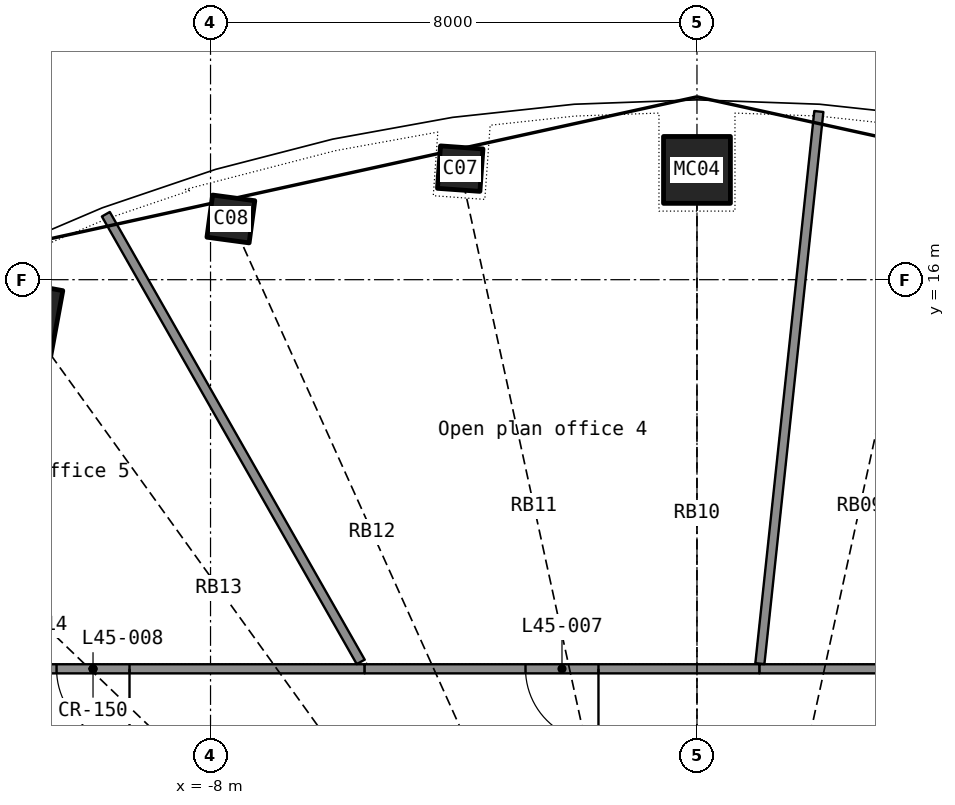
"""IFC4 building model, lengths in metres.
Left out: names, types, materials, properties, quantities, classifications, styles, units other than length and angle.
Written with IfcOpenShell. Run it as: python <this file> out.ifc"""

import sys

from ifc_helpers import new_model, si_unit, direction, frame, frame_2d, origin, origin_2d, place, context, subcontext, project, spatial, rectangle, hollow_rectangle, extrude, element, fill, save


model = new_model("IFC4")
c1 = context("Model", 3, precision=1e-05, world=origin(), true_north=direction((0.0, 1.0)))
c2 = subcontext(c1, "Body", "Model", "MODEL_VIEW")
j1 = project(units=[si_unit("LENGTHUNIT", "METRE"), si_unit("PLANEANGLEUNIT", "RADIAN")], contexts=[c1])
p1 = place(None, origin())
s1 = spatial("IfcSite", under=j1, at=p1, CompositionType="ELEMENT")
p2 = place(p1, origin())
s2 = spatial("IfcBuilding", under=s1, at=p2, CompositionType="ELEMENT")
p3 = place(p2, frame((0.0, 0.0, 186.7)))
s3 = spatial("IfcBuildingStorey", under=s2, at=p3, CompositionType="ELEMENT", Elevation=186.7)
p4 = place(p3, frame((0.0, 17.805, 0.0), z_axis=(0.0, -0.028296154, 0.999599584), x_axis=(1.0, 0.0, 0.0)))
e1 = element("IfcColumn", 1, at=p4, inside=s3, PredefinedType="COLUMN", context=c2, shape_type="SweptSolid", body=[
    extrude(hollow_rectangle(XDim=1.1, YDim=1.1, WallThickness=0.032, at=origin_2d()), origin(), (0.0, 0.0, 1.0), 3.701),
])
for number, where, z_axis, x_axis in (
    (2, (-3.894, 17.826, 0.0), (0.006, -0.028, 1.0), (0.99, 0.14, -0.002)),
    (3, (-7.665, 16.999, 0.0), (0.012, -0.027, 1.0), (0.96, 0.279, -0.004)),
):
    element("IfcColumn", number, at=place(p3, frame(where, z_axis=z_axis, x_axis=x_axis)), inside=s3, PredefinedType="COLUMN", context=c2, shape_type="SweptSolid", body=[
        extrude(hollow_rectangle(XDim=0.7, YDim=0.7, WallThickness=0.025, at=origin_2d()), origin(), (0.0, 0.0, 1.0), 3.701),
    ])
p5 = place(p3, frame((-11.07, 15.378, 0.0), z_axis=(0.017346173, -0.024535271, 0.999548463), x_axis=(0.907569861, 0.419865826, -0.0054438)))
e4 = element("IfcColumn", 4, at=p5, inside=s3, PredefinedType="COLUMN", context=c2, shape_type="SweptSolid", body=[
    extrude(hollow_rectangle(XDim=1.1, YDim=1.1, WallThickness=0.032, at=origin_2d()), origin(), (0.0, 0.0, 1.0), 3.702),
])
p6 = place(p3, frame((11.72, 9.6, 0.0), z_axis=(0.0, 0.0, 1.0), x_axis=(-1.0, 0.0, 0.0)))
e5 = element("IfcWall", 5, at=p6, inside=s3, PredefinedType="PARTITIONING", context=c2, shape_type="SweptSolid", body=[
    extrude(rectangle(XDim=10.695, YDim=0.15, at=frame_2d((5.347, 0.0))), origin(), (0.0, 0.0, 1.0), 2.4),
])
p7 = place(p6, frame((4.747, 0.0, 0.0)))
e6 = element("IfcOpeningElement", 6, at=p7, cuts=e5, PredefinedType="OPENING", context=c2, shape_type="SweptSolid", body=[
    extrude(rectangle(XDim=1.2, YDim=2.2, at=frame_2d((0.6, 1.1))), frame((0.0, 0.085, 0.0), z_axis=(0.0, -1.0, 0.0), x_axis=(1.0, 0.0, 0.0)), (0.0, 0.0, 1.0), 0.17),
])
p8 = place(p3, frame((2.004, 18.766, 0.0), z_axis=(0.0, 0.0, 1.0), x_axis=(-0.106208417, -0.99434389, 0.0)))
e7 = element("IfcWall", 7, at=p8, inside=s3, PredefinedType="PARTITIONING", context=c2, shape_type="SweptSolid", body=[
    extrude(rectangle(XDim=9.133, YDim=0.15, at=frame_2d((4.566, 0.0))), origin(), (0.0, 0.0, 1.0), 2.4),
])
p9 = place(p3, frame((-5.465, 9.6, 0.0), z_axis=(0.0, 0.0, 1.0), x_axis=(-1.0, 0.0, 0.0)))
e8 = element("IfcWall", 8, at=p9, inside=s3, PredefinedType="PARTITIONING", context=c2, shape_type="SweptSolid", body=[
    extrude(rectangle(XDim=8.935, YDim=0.15, at=frame_2d((4.467, 0.0))), origin(), (0.0, 0.0, 1.0), 2.4),
])
p10 = place(p9, frame((3.867, 0.0, 0.0)))
e9 = element("IfcOpeningElement", 9, at=p10, cuts=e8, PredefinedType="OPENING", context=c2, shape_type="SweptSolid", body=[
    extrude(rectangle(XDim=1.2, YDim=2.2, at=frame_2d((0.6, 1.1))), frame((0.0, 0.085, 0.0), z_axis=(0.0, -1.0, 0.0), x_axis=(1.0, 0.0, 0.0)), (0.0, 0.0, 1.0), 0.17),
])
p11 = place(p3, frame((-9.722, 17.077, 0.0), z_axis=(0.0, 0.0, 1.0), x_axis=(0.494732537, -0.86904529, 0.0)))
e10 = element("IfcWall", 10, at=p11, inside=s3, PredefinedType="PARTITIONING", context=c2, shape_type="SweptSolid", body=[
    extrude(rectangle(XDim=8.473, YDim=0.15, at=frame_2d((4.236, 0.0))), origin(), (0.0, 0.0, 1.0), 2.4),
])
p12 = place(p3, frame((1.025, 9.6, 0.0), z_axis=(0.0, 0.0, 1.0), x_axis=(-1.0, 0.0, 0.0)))
e11 = element("IfcWall", 11, at=p12, inside=s3, PredefinedType="PARTITIONING", context=c2, shape_type="SweptSolid", body=[
    extrude(rectangle(XDim=6.49, YDim=0.15, at=frame_2d((3.245, 0.0))), origin(), (0.0, 0.0, 1.0), 2.4),
])
p13 = place(p12, frame((2.645, 0.0, 0.0)))
e12 = element("IfcOpeningElement", 12, at=p13, cuts=e11, PredefinedType="OPENING", context=c2, shape_type="SweptSolid", body=[
    extrude(rectangle(XDim=1.2, YDim=2.2, at=frame_2d((0.6, 1.1))), frame((0.0, 0.085, 0.0), z_axis=(0.0, -1.0, 0.0), x_axis=(1.0, 0.0, 0.0)), (0.0, 0.0, 1.0), 0.17),
])
p14 = place(p13, origin())
e13 = element("IfcDoor", 13, at=p14, inside=s3, OperationType="DOUBLE_DOOR_SINGLE_SWING", PredefinedType="DOOR", context=c2, shape_type="SweptSolid", body=[
    extrude(rectangle(XDim=1.2, YDim=2.2, at=frame_2d((0.6, 1.1))), frame((0.0, 0.025, 0.0), z_axis=(0.0, -1.0, 0.0), x_axis=(1.0, 0.0, 0.0)), (0.0, 0.0, 1.0), 0.05),
])
fill(e12, e13)
p15 = place(p10, origin())
e14 = element("IfcDoor", 14, at=p15, inside=s3, OperationType="DOUBLE_DOOR_SINGLE_SWING", PredefinedType="DOOR", context=c2, shape_type="SweptSolid", body=[
    extrude(rectangle(XDim=1.2, YDim=2.2, at=frame_2d((0.6, 1.1))), frame((0.0, 0.025, 0.0), z_axis=(0.0, -1.0, 0.0), x_axis=(1.0, 0.0, 0.0)), (0.0, 0.0, 1.0), 0.05),
])
fill(e9, e14)
save(model, sys.argv[1])
